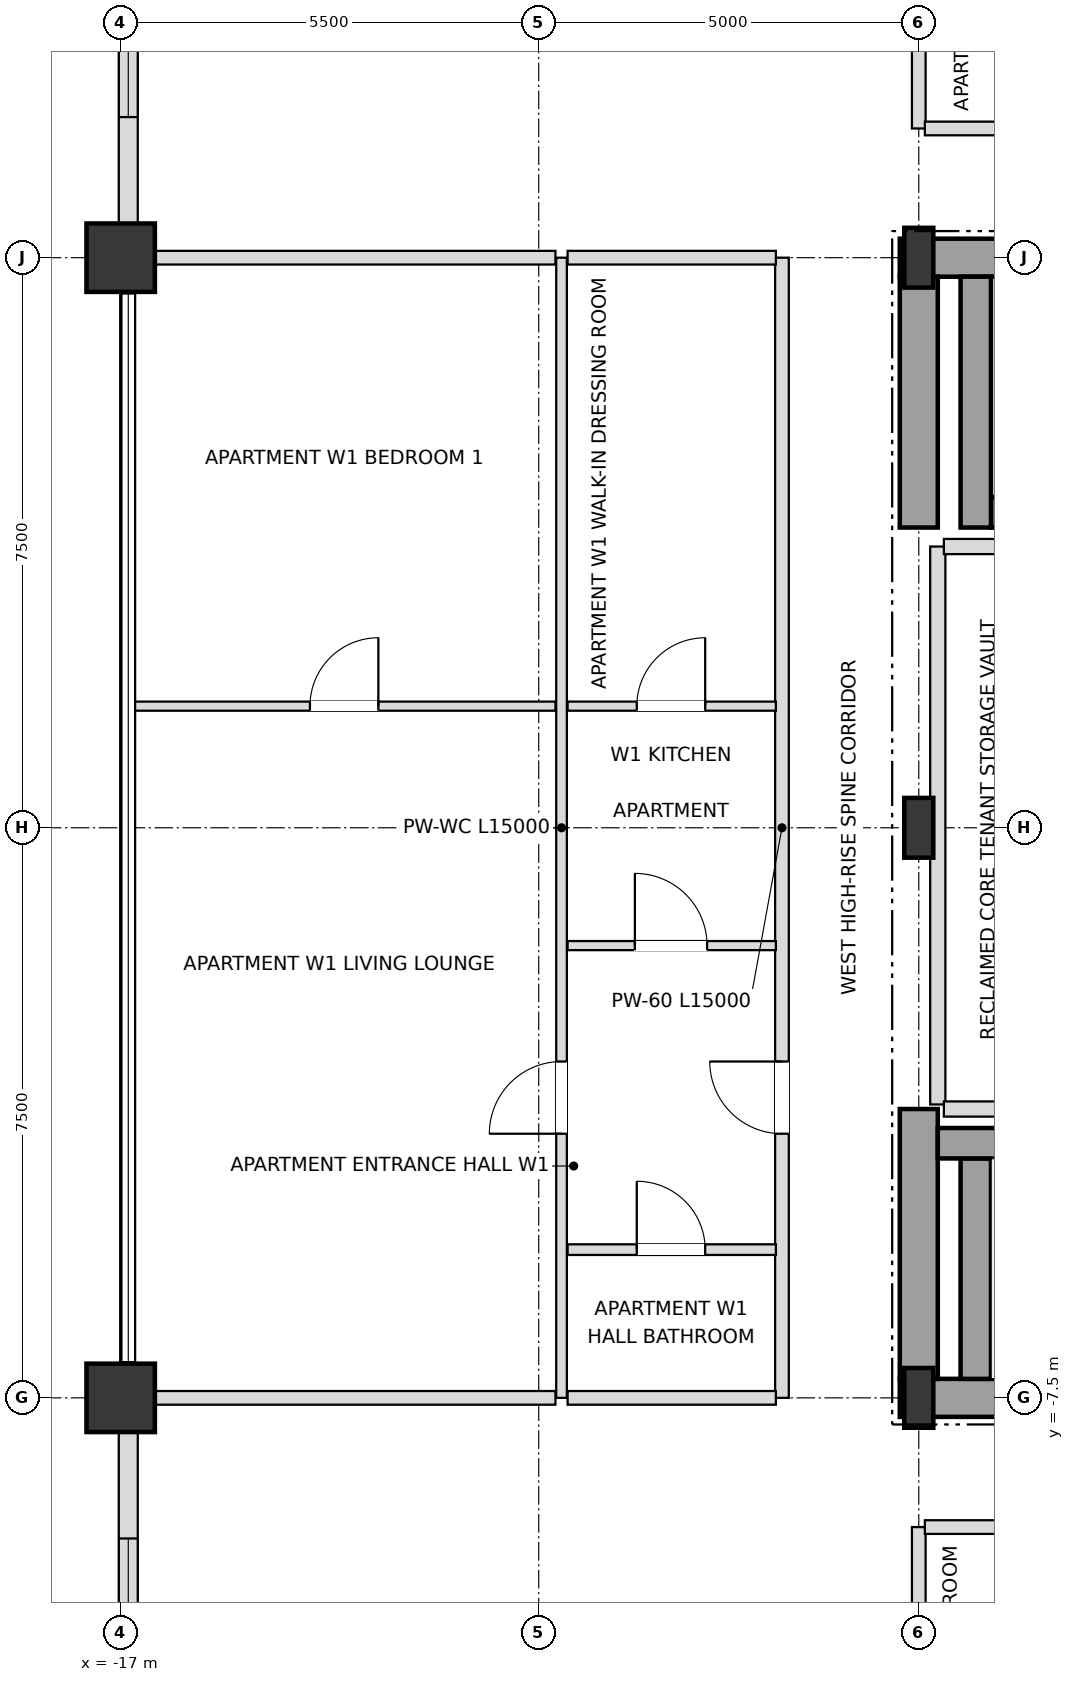
"""IFC4 building model, lengths in metres.
Left out: names, types, materials, properties, quantities, classifications, styles, units other than length and angle.
Written with IfcOpenShell. Run it as: python <this file> out.ifc"""

import sys

from ifc_helpers import new_model, si_unit, direction, frame, frame_2d, origin, origin_2d, place, context, subcontext, project, spatial, rectangle, i_section, extrude, element, fill, save


model = new_model("IFC4")
c1 = context("Model", 3, precision=1e-05, world=origin(), true_north=direction((0.0, 1.0)))
c2 = subcontext(c1, "Body", "Model", "MODEL_VIEW")
j1 = project(units=[si_unit("LENGTHUNIT", "METRE"), si_unit("PLANEANGLEUNIT", "RADIAN")], contexts=[c1])
p1 = place(None, origin())
s1 = spatial("IfcSite", under=j1, at=p1, CompositionType="ELEMENT")
p2 = place(p1, origin())
s2 = spatial("IfcBuilding", under=s1, at=p2, CompositionType="ELEMENT")
p3 = place(p2, frame((0.0, 0.0, 225.9)))
s3 = spatial("IfcBuildingStorey", under=s2, at=p3, CompositionType="ELEMENT", Elevation=225.9)
for number, where, z_axis, x_axis in (
    (1, (-6.5, -7.5, 0.0), (0.0, 0.0, 1.0), (1.0, 0.0, 0.0)),
    (2, (-6.5, 0.0, 0.0), (0.0, 0.0, 1.0), (1.0, 0.0, 0.0)),
    (3, (-6.5, 7.5, 0.0), (0.0, 0.0, 1.0), (1.0, 0.0, 0.0)),
):
    element("IfcColumn", number, at=place(p3, frame(where, z_axis=z_axis, x_axis=x_axis)), inside=s3, PredefinedType="COLUMN", context=c2, shape_type="SweptSolid", body=[
        extrude(i_section(OverallWidth=0.382, OverallDepth=0.786, WebThickness=0.02, FlangeThickness=0.033, at=origin_2d()), origin(), (0.0, 0.0, 1.0), 3.6),
    ])
for number, where, z_axis, x_axis in (
    (4, (-17.0, 7.5, 0.0), (0.0, 0.0, 1.0), (1.0, 0.0, 0.0)),
    (5, (-17.0, -7.5, 0.0), (0.0, 0.0, 1.0), (1.0, 0.0, 0.0)),
):
    element("IfcColumn", number, at=place(p3, frame(where, z_axis=z_axis, x_axis=x_axis)), inside=s3, PredefinedType="USERDEFINED", context=c2, shape_type="SweptSolid", body=[
        extrude(rectangle(XDim=0.9, YDim=0.9, at=origin_2d()), origin(), (0.0, 0.0, 1.0), 3.6),
    ])
p4 = place(p3, frame((-16.9, 12.555, 0.0), z_axis=(0.0, 0.0, 1.0), x_axis=(0.0, -1.0, 0.0)))
e6 = element("IfcWall", 6, at=p4, inside=s3, PredefinedType="SOLIDWALL", context=c2, shape_type="SweptSolid", body=[
    extrude(rectangle(XDim=4.61, YDim=0.25, at=frame_2d((2.305, 0.0))), origin(), (0.0, 0.0, 1.0), 2.748),
])
p5 = place(p4, frame((1.405, 0.0, 0.72)))
e7 = element("IfcOpeningElement", 7, at=p5, cuts=e6, PredefinedType="OPENING", context=c2, shape_type="SweptSolid", body=[
    extrude(rectangle(XDim=1.8, YDim=1.68, at=frame_2d((0.9, 0.84))), frame((0.0, 0.135, 0.0), z_axis=(0.0, -1.0, 0.0), x_axis=(1.0, 0.0, 0.0)), (0.0, 0.0, 1.0), 0.27),
])
p6 = place(p3, frame((-16.9, -7.945, 0.0), z_axis=(0.0, 0.0, 1.0), x_axis=(0.0, -1.0, 0.0)))
e8 = element("IfcWall", 8, at=p6, inside=s3, PredefinedType="SOLIDWALL", context=c2, shape_type="SweptSolid", body=[
    extrude(rectangle(XDim=4.61, YDim=0.25, at=frame_2d((2.305, 0.0))), origin(), (0.0, 0.0, 1.0), 2.748),
])
p7 = place(p6, frame((1.405, 0.0, 0.72)))
e9 = element("IfcOpeningElement", 9, at=p7, cuts=e8, PredefinedType="OPENING", context=c2, shape_type="SweptSolid", body=[
    extrude(rectangle(XDim=1.8, YDim=1.68, at=frame_2d((0.9, 0.84))), frame((0.0, 0.135, 0.0), z_axis=(0.0, -1.0, 0.0), x_axis=(1.0, 0.0, 0.0)), (0.0, 0.0, 1.0), 0.27),
])
p8 = place(p3, frame((-6.75, -7.5, 0.0), z_axis=(0.0, 0.0, 1.0), x_axis=(1.0, 0.0, 0.0)))
e10 = element("IfcWall", 10, at=p8, inside=s3, PredefinedType="SHEAR", context=c2, shape_type="SweptSolid", body=[
    extrude(rectangle(XDim=6.75, YDim=0.5, at=frame_2d((3.375, 0.0))), origin(), (0.0, 0.0, 1.0), 3.38),
])
p9 = place(p3, frame((-6.75, 7.5, 0.0), z_axis=(0.0, 0.0, 1.0), x_axis=(1.0, 0.0, 0.0)))
e11 = element("IfcWall", 11, at=p9, inside=s3, PredefinedType="SHEAR", context=c2, shape_type="SweptSolid", body=[
    extrude(rectangle(XDim=6.75, YDim=0.5, at=frame_2d((3.375, 0.0))), origin(), (0.0, 0.0, 1.0), 3.38),
])
p10 = place(p9, frame((1.65, 0.0, 0.0)))
e12 = element("IfcOpeningElement", 12, at=p10, cuts=e11, PredefinedType="OPENING", context=c2, shape_type="SweptSolid", body=[
    extrude(rectangle(XDim=1.05, YDim=2.15, at=frame_2d((0.525, 1.075))), frame((0.0, 0.26, 0.0), z_axis=(0.0, -1.0, 0.0), x_axis=(1.0, 0.0, 0.0)), (0.0, 0.0, 1.0), 0.52),
])
p11 = place(p3, frame((-6.5, -7.25, 0.0), z_axis=(0.0, 0.0, 1.0), x_axis=(0.0, 1.0, 0.0)))
e13 = element("IfcWall", 13, at=p11, inside=s3, PredefinedType="SHEAR", context=c2, shape_type="SweptSolid", body=[
    extrude(rectangle(XDim=3.55, YDim=0.5, at=frame_2d((1.775, 0.0))), origin(), (0.0, 0.0, 1.0), 3.38),
])
p12 = place(p3, frame((-6.5, 3.95, 0.0), z_axis=(0.0, 0.0, 1.0), x_axis=(0.0, 1.0, 0.0)))
e14 = element("IfcWall", 14, at=p12, inside=s3, PredefinedType="SHEAR", context=c2, shape_type="SweptSolid", body=[
    extrude(rectangle(XDim=3.3, YDim=0.5, at=frame_2d((1.65, 0.0))), origin(), (0.0, 0.0, 1.0), 3.38),
])
p13 = place(p3, frame((-5.75, -7.25, 0.0), z_axis=(0.0, 0.0, 1.0), x_axis=(0.0, 1.0, 0.0)))
e15 = element("IfcWall", 15, at=p13, inside=s3, PredefinedType="SHEAR", context=c2, shape_type="SweptSolid", body=[
    extrude(rectangle(XDim=2.9, YDim=0.4, at=frame_2d((1.45, 0.0))), origin(), (0.0, 0.0, 1.0), 3.38),
])
p14 = place(p3, frame((-6.25, -4.15, 0.0), z_axis=(0.0, 0.0, 1.0), x_axis=(1.0, 0.0, 0.0)))
e16 = element("IfcWall", 16, at=p14, inside=s3, PredefinedType="SHEAR", context=c2, shape_type="SweptSolid", body=[
    extrude(rectangle(XDim=7.78, YDim=0.4, at=frame_2d((3.89, 0.0))), origin(), (0.0, 0.0, 1.0), 3.38),
])
p15 = place(p3, frame((-5.55, 4.15, 0.0), z_axis=(0.0, 0.0, 1.0), x_axis=(1.0, 0.0, 0.0)))
e17 = element("IfcWall", 17, at=p15, inside=s3, PredefinedType="SHEAR", context=c2, shape_type="SweptSolid", body=[
    extrude(rectangle(XDim=7.08, YDim=0.4, at=frame_2d((3.54, 0.0))), origin(), (0.0, 0.0, 1.0), 3.38),
])
p16 = place(p3, frame((-5.75, 3.95, 0.0), z_axis=(0.0, 0.0, 1.0), x_axis=(0.0, 1.0, 0.0)))
e18 = element("IfcWall", 18, at=p16, inside=s3, PredefinedType="SHEAR", context=c2, shape_type="SweptSolid", body=[
    extrude(rectangle(XDim=3.3, YDim=0.4, at=frame_2d((1.65, 0.0))), origin(), (0.0, 0.0, 1.0), 3.38),
])
p17 = place(p3, frame((-11.2, -7.5, 0.0), z_axis=(0.0, 0.0, 1.0), x_axis=(0.0, 1.0, 0.0)))
e19 = element("IfcWall", 19, at=p17, inside=s3, PredefinedType="PARTITIONING", context=c2, shape_type="SweptSolid", body=[
    extrude(rectangle(XDim=15.0, YDim=0.14, at=frame_2d((7.5, 0.0))), origin(), (0.0, 0.0, 1.0), 3.38),
])
p18 = place(p17, frame((3.475, 0.0, 0.0)))
e20 = element("IfcOpeningElement", 20, at=p18, cuts=e19, PredefinedType="OPENING", context=c2, shape_type="SweptSolid", body=[
    extrude(rectangle(XDim=0.95, YDim=2.1, at=frame_2d((0.475, 1.05))), frame((0.0, 0.08, 0.0), z_axis=(0.0, -1.0, 0.0), x_axis=(1.0, 0.0, 0.0)), (0.0, 0.0, 1.0), 0.16),
])
p19 = place(p3, frame((-8.3, -7.5, 0.0), z_axis=(0.0, 0.0, 1.0), x_axis=(0.0, 1.0, 0.0)))
e21 = element("IfcWall", 21, at=p19, inside=s3, PredefinedType="PARTITIONING", context=c2, shape_type="SweptSolid", body=[
    extrude(rectangle(XDim=15.0, YDim=0.18, at=frame_2d((7.5, 0.0))), origin(), (0.0, 0.0, 1.0), 3.38),
])
p20 = place(p19, frame((3.475, 0.0, 0.0)))
e22 = element("IfcOpeningElement", 22, at=p20, cuts=e21, PredefinedType="OPENING", context=c2, shape_type="SweptSolid", body=[
    extrude(rectangle(XDim=0.95, YDim=2.15, at=frame_2d((0.475, 1.075))), frame((0.0, 0.1, 0.0), z_axis=(0.0, -1.0, 0.0), x_axis=(1.0, 0.0, 0.0)), (0.0, 0.0, 1.0), 0.2),
])
for number, where, z_axis, x_axis in (
    (23, (-6.5, -19.9, 0.0), (0.0, 0.0, 1.0), (0.0, 1.0, 0.0)),
    (24, (-6.5, 9.2, 0.0), (0.0, 0.0, 1.0), (0.0, 1.0, 0.0)),
):
    element("IfcWall", number, at=place(p3, frame(where, z_axis=z_axis, x_axis=x_axis)), inside=s3, PredefinedType="PARTITIONING", context=c2, shape_type="SweptSolid", body=[
        extrude(rectangle(XDim=10.7, YDim=0.18, at=frame_2d((5.35, 0.0))), origin(), (0.0, 0.0, 1.0), 2.826),
    ])
p21 = place(p3, frame((-6.25, -3.64, 0.0), z_axis=(0.0, 0.0, 1.0), x_axis=(0.0, 1.0, 0.0)))
e25 = element("IfcWall", 25, at=p21, inside=s3, PredefinedType="SOLIDWALL", context=c2, shape_type="SweptSolid", body=[
    extrude(rectangle(XDim=7.34, YDim=0.2, at=frame_2d((3.67, 0.0))), origin(), (0.0, 0.0, 1.0), 3.38),
])
p22 = place(p3, frame((-6.42, -9.2, 0.0), z_axis=(0.0, 0.0, 1.0), x_axis=(1.0, 0.0, 0.0)))
e26 = element("IfcWall", 26, at=p22, inside=s3, PredefinedType="PARTITIONING", context=c2, shape_type="SweptSolid", body=[
    extrude(rectangle(XDim=1.64, YDim=0.18, at=frame_2d((0.82, 0.0))), origin(), (0.0, 0.0, 1.0), 3.38),
])
p23 = place(p3, frame((-16.9, -7.5, 0.0), z_axis=(0.0, 0.0, 1.0), x_axis=(1.0, 0.0, 0.0)))
e27 = element("IfcWall", 27, at=p23, inside=s3, PredefinedType="PARTITIONING", context=c2, shape_type="SweptSolid", body=[
    extrude(rectangle(XDim=5.62, YDim=0.18, at=frame_2d((2.81, 0.0))), origin(), (0.0, 0.0, 1.0), 2.826),
])
p24 = place(p3, frame((-11.12, -7.5, 0.0), z_axis=(0.0, 0.0, 1.0), x_axis=(1.0, 0.0, 0.0)))
e28 = element("IfcWall", 28, at=p24, inside=s3, PredefinedType="PARTITIONING", context=c2, shape_type="SweptSolid", body=[
    extrude(rectangle(XDim=2.74, YDim=0.18, at=frame_2d((1.37, 0.0))), origin(), (0.0, 0.0, 1.0), 2.826),
])
p25 = place(p3, frame((-11.12, -5.55, 0.0), z_axis=(0.0, 0.0, 1.0), x_axis=(1.0, 0.0, 0.0)))
e29 = element("IfcWall", 29, at=p25, inside=s3, PredefinedType="PARTITIONING", context=c2, shape_type="SweptSolid", body=[
    extrude(rectangle(XDim=2.74, YDim=0.14, at=frame_2d((1.37, 0.0))), origin(), (0.0, 0.0, 1.0), 3.38),
])
p26 = place(p25, frame((0.91, 0.0, 0.0)))
e30 = element("IfcOpeningElement", 30, at=p26, cuts=e29, PredefinedType="OPENING", context=c2, shape_type="SweptSolid", body=[
    extrude(rectangle(XDim=0.9, YDim=2.1, at=frame_2d((0.45, 1.05))), frame((0.0, 0.08, 0.0), z_axis=(0.0, -1.0, 0.0), x_axis=(1.0, 0.0, 0.0)), (0.0, 0.0, 1.0), 0.16),
])
p27 = place(p3, frame((-6.17, -3.7, 0.0), z_axis=(0.0, 0.0, 1.0), x_axis=(1.0, 0.0, 0.0)))
e31 = element("IfcWall", 31, at=p27, inside=s3, PredefinedType="SOLIDWALL", context=c2, shape_type="SweptSolid", body=[
    extrude(rectangle(XDim=1.94, YDim=0.2, at=frame_2d((0.97, 0.0))), origin(), (0.0, 0.0, 1.0), 3.38),
])
p28 = place(p3, frame((-11.12, -1.55, 0.0), z_axis=(0.0, 0.0, 1.0), x_axis=(1.0, 0.0, 0.0)))
e32 = element("IfcWall", 32, at=p28, inside=s3, PredefinedType="PARTITIONING", context=c2, shape_type="SweptSolid", body=[
    extrude(rectangle(XDim=2.74, YDim=0.12, at=frame_2d((1.37, 0.0))), origin(), (0.0, 0.0, 1.0), 3.38),
])
p29 = place(p28, frame((0.885, 0.0, 0.0)))
e33 = element("IfcOpeningElement", 33, at=p29, cuts=e32, PredefinedType="OPENING", context=c2, shape_type="SweptSolid", body=[
    extrude(rectangle(XDim=0.95, YDim=2.1, at=frame_2d((0.475, 1.05))), frame((0.0, 0.07, 0.0), z_axis=(0.0, -1.0, 0.0), x_axis=(1.0, 0.0, 0.0)), (0.0, 0.0, 1.0), 0.14),
])
p30 = place(p3, frame((-16.82, 1.6, 0.0), z_axis=(0.0, 0.0, 1.0), x_axis=(1.0, 0.0, 0.0)))
e34 = element("IfcWall", 34, at=p30, inside=s3, PredefinedType="PARTITIONING", context=c2, shape_type="SweptSolid", body=[
    extrude(rectangle(XDim=5.54, YDim=0.12, at=frame_2d((2.77, 0.0))), origin(), (0.0, 0.0, 1.0), 3.018),
])
p31 = place(p30, frame((2.31, 0.0, 0.0)))
e35 = element("IfcOpeningElement", 35, at=p31, cuts=e34, PredefinedType="OPENING", context=c2, shape_type="SweptSolid", body=[
    extrude(rectangle(XDim=0.9, YDim=2.1, at=frame_2d((0.45, 1.05))), frame((0.0, 0.07, 0.0), z_axis=(0.0, -1.0, 0.0), x_axis=(1.0, 0.0, 0.0)), (0.0, 0.0, 1.0), 0.14),
])
p32 = place(p3, frame((-11.12, 1.6, 0.0), z_axis=(0.0, 0.0, 1.0), x_axis=(1.0, 0.0, 0.0)))
e36 = element("IfcWall", 36, at=p32, inside=s3, PredefinedType="PARTITIONING", context=c2, shape_type="SweptSolid", body=[
    extrude(rectangle(XDim=2.74, YDim=0.12, at=frame_2d((1.37, 0.0))), origin(), (0.0, 0.0, 1.0), 3.38),
])
p33 = place(p32, frame((0.91, 0.0, 0.0)))
e37 = element("IfcOpeningElement", 37, at=p33, cuts=e36, PredefinedType="OPENING", context=c2, shape_type="SweptSolid", body=[
    extrude(rectangle(XDim=0.9, YDim=2.1, at=frame_2d((0.45, 1.05))), frame((0.0, 0.07, 0.0), z_axis=(0.0, -1.0, 0.0), x_axis=(1.0, 0.0, 0.0)), (0.0, 0.0, 1.0), 0.14),
])
p34 = place(p3, frame((-6.17, 3.7, 0.0), z_axis=(0.0, 0.0, 1.0), x_axis=(1.0, 0.0, 0.0)))
e38 = element("IfcWall", 38, at=p34, inside=s3, PredefinedType="SOLIDWALL", context=c2, shape_type="SweptSolid", body=[
    extrude(rectangle(XDim=1.94, YDim=0.2, at=frame_2d((0.97, 0.0))), origin(), (0.0, 0.0, 1.0), 3.38),
])
p35 = place(p3, frame((-16.9, 7.5, 0.0), z_axis=(0.0, 0.0, 1.0), x_axis=(1.0, 0.0, 0.0)))
e39 = element("IfcWall", 39, at=p35, inside=s3, PredefinedType="PARTITIONING", context=c2, shape_type="SweptSolid", body=[
    extrude(rectangle(XDim=5.62, YDim=0.18, at=frame_2d((2.81, 0.0))), origin(), (0.0, 0.0, 1.0), 2.826),
])
p36 = place(p3, frame((-11.12, 7.5, 0.0), z_axis=(0.0, 0.0, 1.0), x_axis=(1.0, 0.0, 0.0)))
e40 = element("IfcWall", 40, at=p36, inside=s3, PredefinedType="PARTITIONING", context=c2, shape_type="SweptSolid", body=[
    extrude(rectangle(XDim=2.74, YDim=0.18, at=frame_2d((1.37, 0.0))), origin(), (0.0, 0.0, 1.0), 2.826),
])
p37 = place(p3, frame((-6.42, 9.2, 0.0), z_axis=(0.0, 0.0, 1.0), x_axis=(1.0, 0.0, 0.0)))
e41 = element("IfcWall", 41, at=p37, inside=s3, PredefinedType="PARTITIONING", context=c2, shape_type="SweptSolid", body=[
    extrude(rectangle(XDim=1.79, YDim=0.18, at=frame_2d((0.895, 0.0))), origin(), (0.0, 0.0, 1.0), 3.38),
])
p38 = place(p5, origin())
e42 = element("IfcWindow", 42, at=p38, inside=s3, PartitioningType="SINGLE_PANEL", PredefinedType="WINDOW", context=c2, shape_type="SweptSolid", body=[
    extrude(rectangle(XDim=1.8, YDim=1.68, at=frame_2d((0.9, 0.84))), frame((0.0, 0.03, 0.0), z_axis=(0.0, -1.0, 0.0), x_axis=(1.0, 0.0, 0.0)), (0.0, 0.0, 1.0), 0.06),
])
fill(e7, e42)
p39 = place(p7, origin())
e43 = element("IfcWindow", 43, at=p39, inside=s3, PartitioningType="SINGLE_PANEL", PredefinedType="WINDOW", context=c2, shape_type="SweptSolid", body=[
    extrude(rectangle(XDim=1.8, YDim=1.68, at=frame_2d((0.9, 0.84))), frame((0.0, 0.03, 0.0), z_axis=(0.0, -1.0, 0.0), x_axis=(1.0, 0.0, 0.0)), (0.0, 0.0, 1.0), 0.06),
])
fill(e9, e43)
p40 = place(p26, origin())
e44 = element("IfcDoor", 44, at=p40, inside=s3, OperationType="SINGLE_SWING_LEFT", PredefinedType="DOOR", context=c2, shape_type="SweptSolid", body=[
    extrude(rectangle(XDim=0.9, YDim=2.1, at=frame_2d((0.45, 1.05))), frame((0.0, 0.025, 0.0), z_axis=(0.0, -1.0, 0.0), x_axis=(1.0, 0.0, 0.0)), (0.0, 0.0, 1.0), 0.05),
])
fill(e30, e44)
p41 = place(p20, origin())
e45 = element("IfcDoor", 45, at=p41, inside=s3, OperationType="SINGLE_SWING_RIGHT", PredefinedType="DOOR", context=c2, shape_type="SweptSolid", body=[
    extrude(rectangle(XDim=0.95, YDim=2.15, at=frame_2d((0.475, 1.075))), frame((0.0, 0.025, 0.0), z_axis=(0.0, -1.0, 0.0), x_axis=(1.0, 0.0, 0.0)), (0.0, 0.0, 1.0), 0.05),
])
fill(e22, e45)
p42 = place(p29, origin())
e46 = element("IfcDoor", 46, at=p42, inside=s3, OperationType="SINGLE_SWING_LEFT", PredefinedType="DOOR", context=c2, shape_type="SweptSolid", body=[
    extrude(rectangle(XDim=0.95, YDim=2.1, at=frame_2d((0.475, 1.05))), frame((0.0, 0.025, 0.0), z_axis=(0.0, -1.0, 0.0), x_axis=(1.0, 0.0, 0.0)), (0.0, 0.0, 1.0), 0.05),
])
fill(e33, e46)
p43 = place(p33, origin())
e47 = element("IfcDoor", 47, at=p43, inside=s3, OperationType="SINGLE_SWING_RIGHT", PredefinedType="DOOR", context=c2, shape_type="SweptSolid", body=[
    extrude(rectangle(XDim=0.9, YDim=2.1, at=frame_2d((0.45, 1.05))), frame((0.0, 0.025, 0.0), z_axis=(0.0, -1.0, 0.0), x_axis=(1.0, 0.0, 0.0)), (0.0, 0.0, 1.0), 0.05),
])
fill(e37, e47)
p44 = place(p18, origin())
e48 = element("IfcDoor", 48, at=p44, inside=s3, OperationType="SINGLE_SWING_LEFT", PredefinedType="DOOR", context=c2, shape_type="SweptSolid", body=[
    extrude(rectangle(XDim=0.95, YDim=2.1, at=frame_2d((0.475, 1.05))), frame((0.0, 0.025, 0.0), z_axis=(0.0, -1.0, 0.0), x_axis=(1.0, 0.0, 0.0)), (0.0, 0.0, 1.0), 0.05),
])
fill(e20, e48)
p45 = place(p31, origin())
e49 = element("IfcDoor", 49, at=p45, inside=s3, OperationType="SINGLE_SWING_RIGHT", PredefinedType="DOOR", context=c2, shape_type="SweptSolid", body=[
    extrude(rectangle(XDim=0.9, YDim=2.1, at=frame_2d((0.45, 1.05))), frame((0.0, 0.025, 0.0), z_axis=(0.0, -1.0, 0.0), x_axis=(1.0, 0.0, 0.0)), (0.0, 0.0, 1.0), 0.05),
])
fill(e35, e49)
save(model, sys.argv[1])
